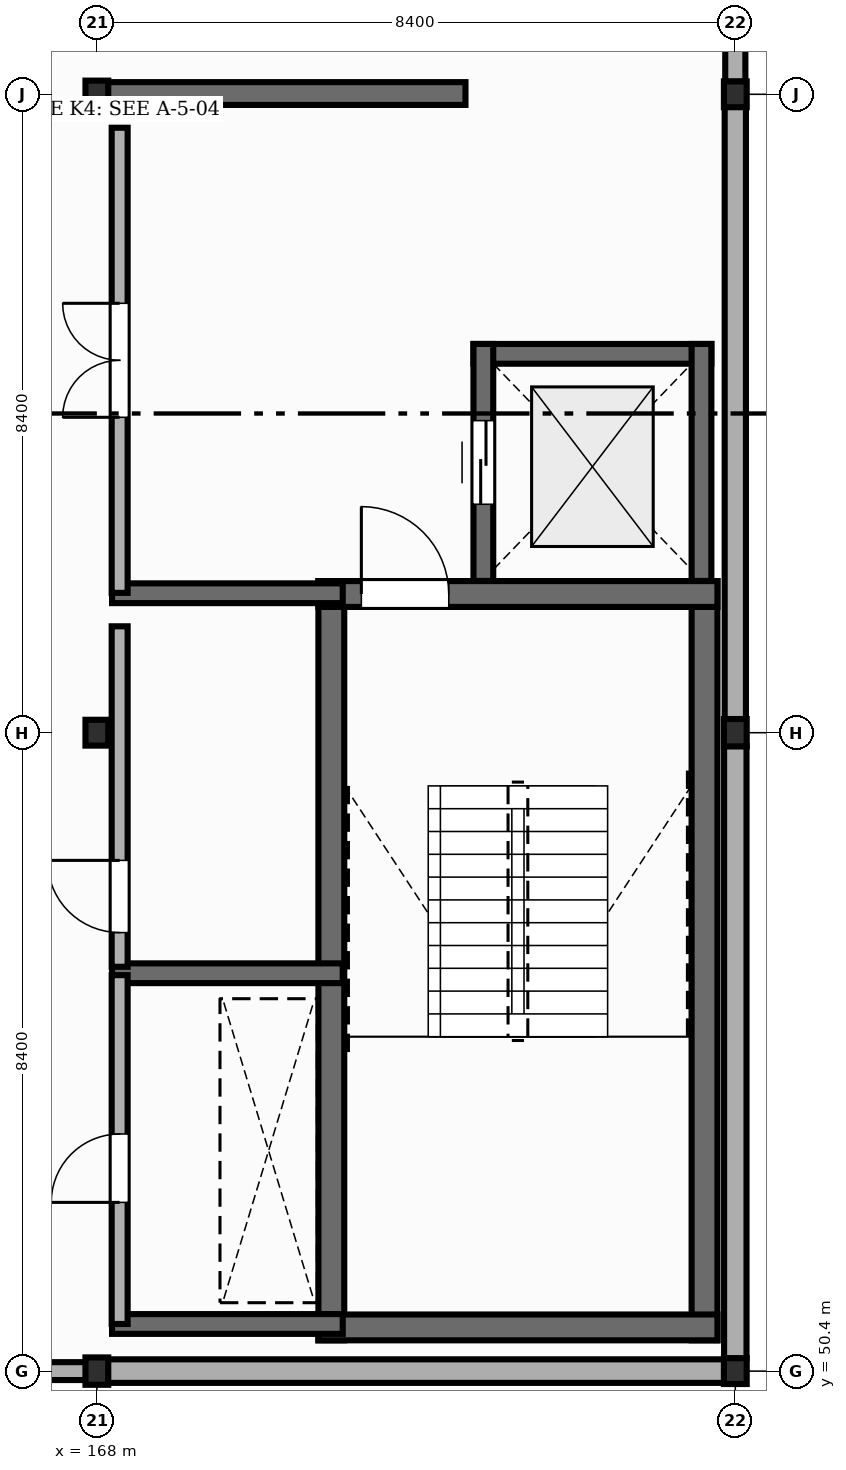
"""IFC4 building model, lengths in metres.
Left out: names, types, materials, properties, quantities, classifications, styles, units other than length and angle.
Written with IfcOpenShell. Run it as: python <this file> out.ifc"""

import sys

from ifc_helpers import new_model, si_unit, direction, frame, frame_2d, origin, origin_2d, place, context, subcontext, project, spatial, rectangle, i_section, extrude, element, fill, save


model = new_model("IFC4")
c1 = context("Model", 3, precision=1e-05, world=origin(), true_north=direction((0.0, 1.0)))
c2 = subcontext(c1, "Body", "Model", "MODEL_VIEW")
j1 = project(units=[si_unit("LENGTHUNIT", "METRE"), si_unit("PLANEANGLEUNIT", "RADIAN")], contexts=[c1])
p1 = place(None, origin())
s1 = spatial("IfcSite", under=j1, at=p1, CompositionType="ELEMENT")
p2 = place(p1, origin())
s2 = spatial("IfcBuilding", under=s1, at=p2, CompositionType="ELEMENT")
p3 = place(p2, frame((0.0, 0.0, 18.0)))
s3 = spatial("IfcBuildingStorey", under=s2, at=p3, CompositionType="ELEMENT", Elevation=18.0)
p4 = place(p3, frame((168.0, 50.4, 0.0), z_axis=(0.0, 0.0, 1.0), x_axis=(1.0, 0.0, 0.0)))
e1 = element("IfcColumn", 1, at=p4, inside=s3, PredefinedType="COLUMN", context=c2, shape_type="SweptSolid", body=[
    extrude(i_section(OverallWidth=0.3, OverallDepth=0.36, WebThickness=0.012, FlangeThickness=0.022, FilletRadius=0.027, at=origin_2d()), origin(), (0.0, 0.0, 1.0), 4.05),
])
p5 = place(p3, frame((168.0, 58.8, 0.0), z_axis=(0.0, 0.0, 1.0), x_axis=(1.0, 0.0, 0.0)))
e2 = element("IfcColumn", 2, at=p5, inside=s3, PredefinedType="COLUMN", context=c2, shape_type="SweptSolid", body=[
    extrude(i_section(OverallWidth=0.3, OverallDepth=0.34, WebThickness=0.012, FlangeThickness=0.021, FilletRadius=0.027, at=origin_2d()), origin(), (0.0, 0.0, 1.0), 4.05),
])
p6 = place(p3, frame((168.0, 67.2, 0.0), z_axis=(0.0, 0.0, 1.0), x_axis=(1.0, 0.0, 0.0)))
e3 = element("IfcColumn", 3, at=p6, inside=s3, PredefinedType="COLUMN", context=c2, shape_type="SweptSolid", body=[
    extrude(i_section(OverallWidth=0.3, OverallDepth=0.36, WebThickness=0.012, FlangeThickness=0.022, FilletRadius=0.027, at=origin_2d()), origin(), (0.0, 0.0, 1.0), 4.05),
])
p7 = place(p3, frame((176.4, 50.4, 0.0), z_axis=(0.0, 0.0, 1.0), x_axis=(1.0, 0.0, 0.0)))
e4 = element("IfcColumn", 4, at=p7, inside=s3, PredefinedType="COLUMN", context=c2, shape_type="SweptSolid", body=[
    extrude(i_section(OverallWidth=0.3, OverallDepth=0.34, WebThickness=0.012, FlangeThickness=0.021, FilletRadius=0.027, at=origin_2d()), origin(), (0.0, 0.0, 1.0), 4.05),
])
p8 = place(p3, frame((176.4, 58.8, 0.0), z_axis=(0.0, 0.0, 1.0), x_axis=(1.0, 0.0, 0.0)))
e5 = element("IfcColumn", 5, at=p8, inside=s3, PredefinedType="COLUMN", context=c2, shape_type="SweptSolid", body=[
    extrude(i_section(OverallWidth=0.3, OverallDepth=0.36, WebThickness=0.012, FlangeThickness=0.022, FilletRadius=0.027, at=origin_2d()), origin(), (0.0, 0.0, 1.0), 4.05),
])
p9 = place(p3, frame((176.4, 67.2, 0.0), z_axis=(0.0, 0.0, 1.0), x_axis=(1.0, 0.0, 0.0)))
e6 = element("IfcColumn", 6, at=p9, inside=s3, PredefinedType="COLUMN", context=c2, shape_type="SweptSolid", body=[
    extrude(i_section(OverallWidth=0.3, OverallDepth=0.34, WebThickness=0.012, FlangeThickness=0.021, FilletRadius=0.027, at=origin_2d()), origin(), (0.0, 0.0, 1.0), 4.05),
])
p10 = place(p3, frame((159.608, 50.4, 0.0), z_axis=(0.0, 0.0, 1.0), x_axis=(1.0, 0.0, 0.0)))
e7 = element("IfcWall", 7, at=p10, inside=s3, PredefinedType="STANDARD", context=c2, shape_type="SweptSolid", body=[
    extrude(rectangle(XDim=8.384, YDim=0.235, at=frame_2d((4.192, 0.0))), origin(), (0.0, 0.0, 1.0), 3.522),
])
p11 = place(p3, frame((168.008, 50.4, 0.0), z_axis=(0.0, 0.0, 1.0), x_axis=(1.0, 0.0, 0.0)))
e8 = element("IfcWall", 8, at=p11, inside=s3, PredefinedType="STANDARD", context=c2, shape_type="SweptSolid", body=[
    extrude(rectangle(XDim=8.384, YDim=0.31, at=frame_2d((4.192, 0.0))), origin(), (0.0, 0.0, 1.0), 3.492),
])
p12 = place(p3, frame((176.4, 50.566, 0.0), z_axis=(0.0, 0.0, 1.0), x_axis=(0.0, 1.0, 0.0)))
e9 = element("IfcWall", 9, at=p12, inside=s3, PredefinedType="STANDARD", context=c2, shape_type="SweptSolid", body=[
    extrude(rectangle(XDim=8.058, YDim=0.295, at=frame_2d((4.029, 0.0))), origin(), (0.0, 0.0, 1.0), 3.582),
])
p13 = place(p3, frame((176.4, 58.976, 0.0), z_axis=(0.0, 0.0, 1.0), x_axis=(0.0, 1.0, 0.0)))
e10 = element("IfcWall", 10, at=p13, inside=s3, PredefinedType="STANDARD", context=c2, shape_type="SweptSolid", body=[
    extrude(rectangle(XDim=8.058, YDim=0.28, at=frame_2d((4.029, 0.0))), origin(), (0.0, 0.0, 1.0), 3.492),
])
p14 = place(p3, frame((176.4, 67.366, 0.0), z_axis=(0.0, 0.0, 1.0), x_axis=(0.0, 1.0, 0.0)))
e11 = element("IfcWall", 11, at=p14, inside=s3, PredefinedType="STANDARD", context=c2, shape_type="SweptSolid", body=[
    extrude(rectangle(XDim=8.058, YDim=0.265, at=frame_2d((4.029, 0.0))), origin(), (0.0, 0.0, 1.0), 3.582),
])
for number, where, z_axis, x_axis in (
    (12, (171.085, 50.805, 0.0), (0.0, 0.0, 1.0), (0.0, 1.0, 0.0)),
    (13, (175.995, 50.805, 0.0), (0.0, 0.0, 1.0), (0.0, 1.0, 0.0)),
):
    element("IfcWall", number, at=place(p3, frame(where, z_axis=z_axis, x_axis=x_axis)), inside=s3, PredefinedType="SHEAR", context=c2, shape_type="SweptSolid", body=[
        extrude(rectangle(XDim=9.99, YDim=0.34, at=frame_2d((4.995, 0.0))), origin(), (0.0, 0.0, 1.0), 3.85),
    ])
p15 = place(p3, frame((170.915, 50.975, 0.0), z_axis=(0.0, 0.0, 1.0), x_axis=(1.0, 0.0, 0.0)))
e14 = element("IfcWall", 14, at=p15, inside=s3, PredefinedType="SHEAR", context=c2, shape_type="SweptSolid", body=[
    extrude(rectangle(XDim=5.25, YDim=0.34, at=frame_2d((2.625, 0.0))), origin(), (0.0, 0.0, 1.0), 3.85),
])
p16 = place(p3, frame((170.915, 60.625, 0.0), z_axis=(0.0, 0.0, 1.0), x_axis=(1.0, 0.0, 0.0)))
e15 = element("IfcWall", 15, at=p16, inside=s3, PredefinedType="SHEAR", context=c2, shape_type="SweptSolid", body=[
    extrude(rectangle(XDim=5.25, YDim=0.34, at=frame_2d((2.625, 0.0))), origin(), (0.0, 0.0, 1.0), 3.85),
])
p17 = place(p16, frame((0.565, 0.0, 0.0)))
e16 = element("IfcOpeningElement", 16, at=p17, cuts=e15, PredefinedType="OPENING", context=c2, shape_type="SweptSolid", body=[
    extrude(rectangle(XDim=1.15, YDim=2.15, at=frame_2d((0.575, 1.075))), frame((0.0, 0.18, 0.0), z_axis=(0.0, -1.0, 0.0), x_axis=(1.0, 0.0, 0.0)), (0.0, 0.0, 1.0), 0.36),
])
p18 = place(p3, frame((172.955, 63.785, 0.0), z_axis=(0.0, 0.0, 1.0), x_axis=(1.0, 0.0, 0.0)))
e17 = element("IfcWall", 17, at=p18, inside=s3, PredefinedType="SHEAR", context=c2, shape_type="SweptSolid", body=[
    extrude(rectangle(XDim=3.13, YDim=0.26, at=frame_2d((1.565, 0.0))), origin(), (0.0, 0.0, 1.0), 3.85),
])
p19 = place(p3, frame((175.955, 60.797, 0.0), z_axis=(0.0, 0.0, 1.0), x_axis=(0.0, 1.0, 0.0)))
e18 = element("IfcWall", 18, at=p19, inside=s3, PredefinedType="SHEAR", context=c2, shape_type="SweptSolid", body=[
    extrude(rectangle(XDim=3.118, YDim=0.26, at=frame_2d((1.559, 0.0))), origin(), (0.0, 0.0, 1.0), 3.85),
])
p20 = place(p3, frame((173.085, 60.797, 0.0), z_axis=(0.0, 0.0, 1.0), x_axis=(0.0, 1.0, 0.0)))
e19 = element("IfcWall", 19, at=p20, inside=s3, PredefinedType="SHEAR", context=c2, shape_type="SweptSolid", body=[
    extrude(rectangle(XDim=3.118, YDim=0.26, at=frame_2d((1.559, 0.0))), origin(), (0.0, 0.0, 1.0), 3.85),
])
p21 = place(p20, frame((1.009, 0.0, 0.0)))
e20 = element("IfcOpeningElement", 20, at=p21, cuts=e19, PredefinedType="OPENING", context=c2, shape_type="SweptSolid", body=[
    extrude(rectangle(XDim=1.1, YDim=2.15, at=frame_2d((0.55, 1.075))), frame((0.0, 0.14, 0.0), z_axis=(0.0, -1.0, 0.0), x_axis=(1.0, 0.0, 0.0)), (0.0, 0.0, 1.0), 0.28),
])
for number, where, z_axis, x_axis in (
    (21, (168.2, 51.02, 0.0), (0.0, 0.0, 1.0), (1.0, 0.0, 0.0)),
    (22, (168.2, 55.635, 0.0), (0.0, 0.0, 1.0), (1.0, 0.0, 0.0)),
    (23, (168.2, 60.635, 0.0), (0.0, 0.0, 1.0), (1.0, 0.0, 0.0)),
):
    element("IfcWall", number, at=place(p3, frame(where, z_axis=z_axis, x_axis=x_axis)), inside=s3, PredefinedType="SHEAR", context=c2, shape_type="SweptSolid", body=[
        extrude(rectangle(XDim=3.035, YDim=0.26, at=frame_2d((1.518, 0.0))), origin(), (0.0, 0.0, 1.0), 3.85),
    ])
p22 = place(p3, frame((167.98, 67.21, 0.0), z_axis=(0.0, 0.0, 1.0), x_axis=(1.0, 0.0, 0.0)))
e24 = element("IfcWall", 24, at=p22, inside=s3, PredefinedType="SHEAR", context=c2, shape_type="SweptSolid", body=[
    extrude(rectangle(XDim=4.87, YDim=0.3, at=frame_2d((2.435, 0.0))), origin(), (0.0, 0.0, 1.0), 3.85),
])
p23 = place(p3, frame((168.3, 51.02, 0.0), z_axis=(0.0, 0.0, 1.0), x_axis=(0.0, 1.0, 0.0)))
e25 = element("IfcWall", 25, at=p23, inside=s3, PredefinedType="STANDARD", context=c2, shape_type="SweptSolid", body=[
    extrude(rectangle(XDim=4.59, YDim=0.21, at=frame_2d((2.295, 0.0))), origin(), (0.0, 0.0, 1.0), 3.452),
])
p24 = place(p23, frame((1.6, 0.0, 0.0)))
e26 = element("IfcOpeningElement", 26, at=p24, cuts=e25, PredefinedType="OPENING", context=c2, shape_type="SweptSolid", body=[
    extrude(rectangle(XDim=0.9, YDim=2.1, at=frame_2d((0.45, 1.05))), frame((0.0, 0.115, 0.0), z_axis=(0.0, -1.0, 0.0), x_axis=(1.0, 0.0, 0.0)), (0.0, 0.0, 1.0), 0.23),
])
p25 = place(p3, frame((168.3, 55.72, 0.0), z_axis=(0.0, 0.0, 1.0), x_axis=(0.0, 1.0, 0.0)))
e27 = element("IfcWall", 27, at=p25, inside=s3, PredefinedType="STANDARD", context=c2, shape_type="SweptSolid", body=[
    extrude(rectangle(XDim=4.48, YDim=0.21, at=frame_2d((2.24, 0.0))), origin(), (0.0, 0.0, 1.0), 3.452),
])
p26 = place(p25, frame((0.45, 0.0, 0.0)))
e28 = element("IfcOpeningElement", 28, at=p26, cuts=e27, PredefinedType="OPENING", context=c2, shape_type="SweptSolid", body=[
    extrude(rectangle(XDim=0.95, YDim=2.15, at=frame_2d((0.475, 1.075))), frame((0.0, 0.115, 0.0), z_axis=(0.0, -1.0, 0.0), x_axis=(1.0, 0.0, 0.0)), (0.0, 0.0, 1.0), 0.23),
])
p27 = place(p3, frame((168.3, 60.64, 0.0), z_axis=(0.0, 0.0, 1.0), x_axis=(0.0, 1.0, 0.0)))
e29 = element("IfcWall", 29, at=p27, inside=s3, PredefinedType="STANDARD", context=c2, shape_type="SweptSolid", body=[
    extrude(rectangle(XDim=6.12, YDim=0.21, at=frame_2d((3.06, 0.0))), origin(), (0.0, 0.0, 1.0), 3.502),
])
p28 = place(p27, frame((2.31, 0.0, 0.0)))
e30 = element("IfcOpeningElement", 30, at=p28, cuts=e29, PredefinedType="OPENING", context=c2, shape_type="SweptSolid", body=[
    extrude(rectangle(XDim=1.5, YDim=2.2, at=frame_2d((0.75, 1.1))), frame((0.0, 0.115, 0.0), z_axis=(0.0, -1.0, 0.0), x_axis=(1.0, 0.0, 0.0)), (0.0, 0.0, 1.0), 0.23),
])
p29 = place(p17, origin())
e31 = element("IfcDoor", 31, at=p29, inside=s3, OperationType="SINGLE_SWING_LEFT", PredefinedType="DOOR", context=c2, shape_type="SweptSolid", body=[
    extrude(rectangle(XDim=1.15, YDim=2.15, at=frame_2d((0.575, 1.075))), frame((0.0, 0.025, 0.0), z_axis=(0.0, -1.0, 0.0), x_axis=(1.0, 0.0, 0.0)), (0.0, 0.0, 1.0), 0.05),
])
fill(e16, e31)
p30 = place(p21, origin())
e32 = element("IfcDoor", 32, at=p30, inside=s3, OperationType="DOUBLE_DOOR_SLIDING", PredefinedType="DOOR", context=c2, shape_type="SweptSolid", body=[
    extrude(rectangle(XDim=1.1, YDim=2.15, at=frame_2d((0.55, 1.075))), frame((0.0, 0.025, 0.0), z_axis=(0.0, -1.0, 0.0), x_axis=(1.0, 0.0, 0.0)), (0.0, 0.0, 1.0), 0.05),
])
fill(e20, e32)
p31 = place(p24, origin())
e33 = element("IfcDoor", 33, at=p31, inside=s3, OperationType="SINGLE_SWING_LEFT", PredefinedType="DOOR", context=c2, shape_type="SweptSolid", body=[
    extrude(rectangle(XDim=0.9, YDim=2.1, at=frame_2d((0.45, 1.05))), frame((0.0, 0.025, 0.0), z_axis=(0.0, -1.0, 0.0), x_axis=(1.0, 0.0, 0.0)), (0.0, 0.0, 1.0), 0.05),
])
fill(e26, e33)
p32 = place(p26, origin())
e34 = element("IfcDoor", 34, at=p32, inside=s3, OperationType="SINGLE_SWING_RIGHT", PredefinedType="DOOR", context=c2, shape_type="SweptSolid", body=[
    extrude(rectangle(XDim=0.95, YDim=2.15, at=frame_2d((0.475, 1.075))), frame((0.0, 0.025, 0.0), z_axis=(0.0, -1.0, 0.0), x_axis=(1.0, 0.0, 0.0)), (0.0, 0.0, 1.0), 0.05),
])
fill(e28, e34)
p33 = place(p28, origin())
e35 = element("IfcDoor", 35, at=p33, inside=s3, OperationType="DOUBLE_DOOR_SINGLE_SWING", PredefinedType="DOOR", context=c2, shape_type="SweptSolid", body=[
    extrude(rectangle(XDim=1.5, YDim=2.2, at=frame_2d((0.75, 1.1))), frame((0.0, 0.025, 0.0), z_axis=(0.0, -1.0, 0.0), x_axis=(1.0, 0.0, 0.0)), (0.0, 0.0, 1.0), 0.05),
])
fill(e30, e35)
save(model, sys.argv[1])
